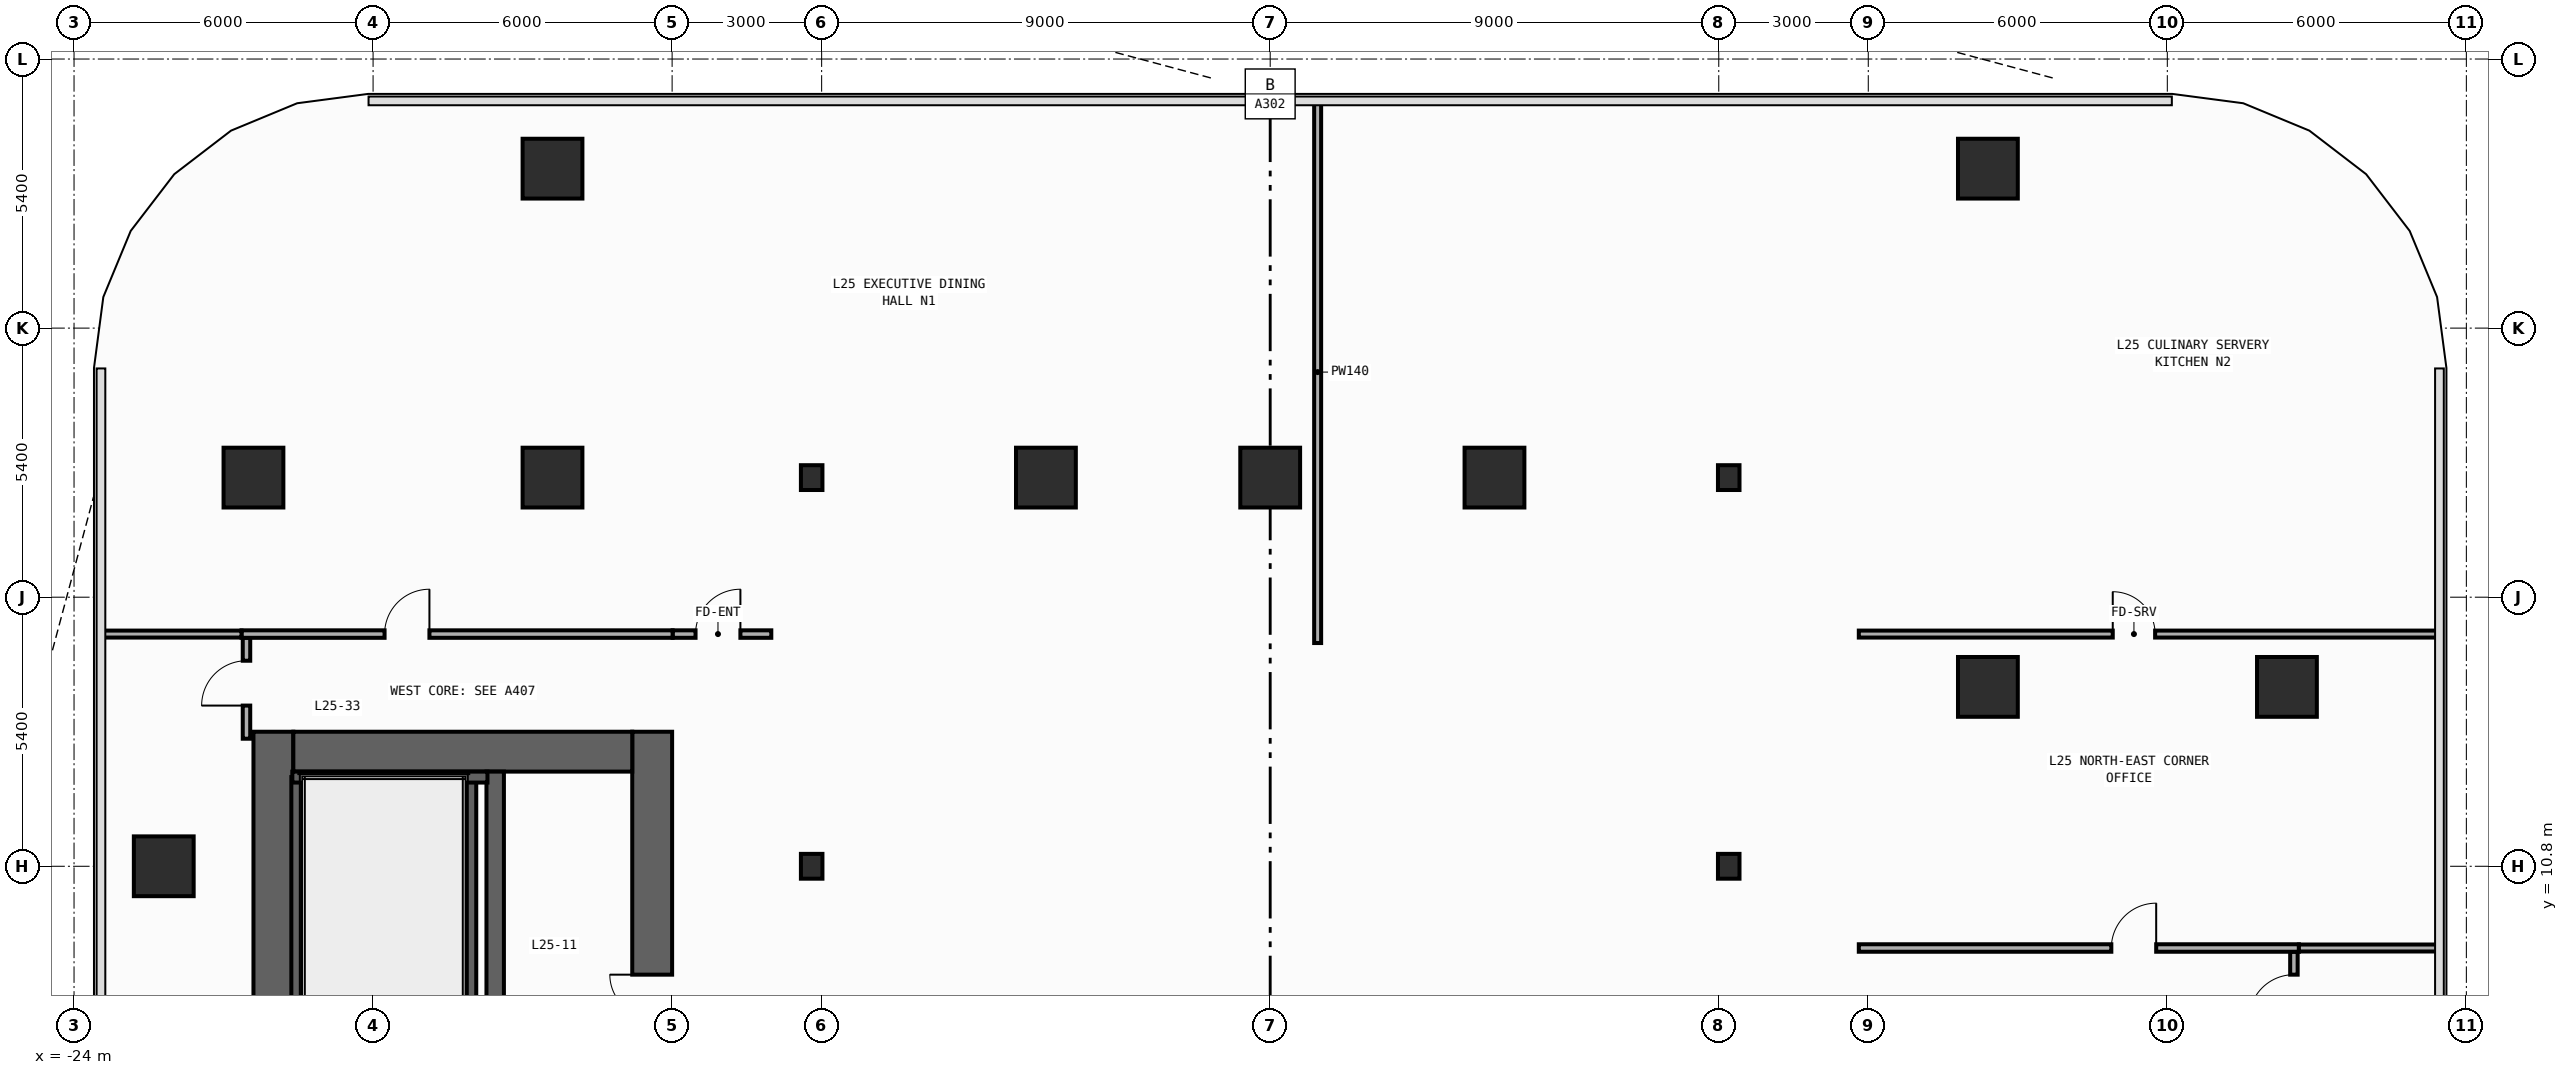
"""IFC4 building model, lengths in metres.
Left out: names, types, materials, properties, quantities, classifications, styles, units other than length and angle.
Written with IfcOpenShell. Run it as: python <this file> out.ifc"""

import sys

from ifc_helpers import new_model, si_unit, direction, frame, frame_2d, origin, origin_2d, place, context, subcontext, project, spatial, rectangle, i_section, extrude, element, fill, save


model = new_model("IFC4")
c1 = context("Model", 3, precision=1e-05, world=origin(), true_north=direction((0.0, 1.0)))
c2 = subcontext(c1, "Body", "Model", "MODEL_VIEW")
j1 = project(units=[si_unit("LENGTHUNIT", "METRE"), si_unit("PLANEANGLEUNIT", "RADIAN")], contexts=[c1])
p1 = place(None, origin())
s1 = spatial("IfcSite", under=j1, at=p1, CompositionType="ELEMENT")
p2 = place(p1, origin())
s2 = spatial("IfcBuilding", under=s1, at=p2, CompositionType="ELEMENT")
p3 = place(p2, frame((0.0, 0.0, 110.0)))
s3 = spatial("IfcBuildingStorey", under=s2, at=p3, CompositionType="ELEMENT", Elevation=110.0)
p4 = place(p3, frame((-20.0, -13.5, 0.0), z_axis=(0.0, 0.0, 1.0), x_axis=(0.0, 1.0, 0.0)))
e1 = element("IfcWall", 1, at=p4, inside=s3, PredefinedType="SHEAR", context=c2, shape_type="SweptSolid", body=[
    extrude(rectangle(XDim=27.0, YDim=0.8, at=frame_2d((13.5, 0.0))), origin(), (0.0, 0.0, 1.0), 3.94),
])
p5 = place(p3, frame((-12.4, -13.5, 0.0), z_axis=(0.0, 0.0, 1.0), x_axis=(0.0, 1.0, 0.0)))
e2 = element("IfcWall", 2, at=p5, inside=s3, PredefinedType="SHEAR", context=c2, shape_type="SweptSolid", body=[
    extrude(rectangle(XDim=27.0, YDim=0.8, at=frame_2d((13.5, 0.0))), origin(), (0.0, 0.0, 1.0), 3.94),
])
p6 = place(p5, frame((10.35, 0.0, 0.0)))
e3 = element("IfcOpeningElement", 3, at=p6, cuts=e2, PredefinedType="OPENING", context=c2, shape_type="SweptSolid", body=[
    extrude(rectangle(XDim=1.1, YDim=2.2, at=frame_2d((0.55, 1.1))), frame((0.0, 0.41, 0.0), z_axis=(0.0, -1.0, 0.0), x_axis=(1.0, 0.0, 0.0)), (0.0, 0.0, 1.0), 0.82),
])
p7 = place(p5, frame((7.15, 0.0, 0.0)))
e4 = element("IfcOpeningElement", 4, at=p7, cuts=e2, PredefinedType="OPENING", context=c2, shape_type="SweptSolid", body=[
    extrude(rectangle(XDim=1.1, YDim=2.2, at=frame_2d((0.55, 1.1))), frame((0.0, 0.41, 0.0), z_axis=(0.0, -1.0, 0.0), x_axis=(1.0, 0.0, 0.0)), (0.0, 0.0, 1.0), 0.82),
])
p8 = place(p5, frame((3.95, 0.0, 0.0)))
e5 = element("IfcOpeningElement", 5, at=p8, cuts=e2, PredefinedType="OPENING", context=c2, shape_type="SweptSolid", body=[
    extrude(rectangle(XDim=1.1, YDim=2.2, at=frame_2d((0.55, 1.1))), frame((0.0, 0.41, 0.0), z_axis=(0.0, -1.0, 0.0), x_axis=(1.0, 0.0, 0.0)), (0.0, 0.0, 1.0), 0.82),
])
p9 = place(p5, frame((15.175, 0.0, 0.0)))
e6 = element("IfcOpeningElement", 6, at=p9, cuts=e2, PredefinedType="OPENING", context=c2, shape_type="SweptSolid", body=[
    extrude(rectangle(XDim=0.85, YDim=2.1, at=frame_2d((0.425, 1.05))), frame((0.0, 0.41, 0.0), z_axis=(0.0, -1.0, 0.0), x_axis=(1.0, 0.0, 0.0)), (0.0, 0.0, 1.0), 0.82),
])
p10 = place(p5, frame((21.275, 0.0, 0.0)))
e7 = element("IfcOpeningElement", 7, at=p10, cuts=e2, PredefinedType="OPENING", context=c2, shape_type="SweptSolid", body=[
    extrude(rectangle(XDim=0.85, YDim=2.1, at=frame_2d((0.425, 1.05))), frame((0.0, 0.41, 0.0), z_axis=(0.0, -1.0, 0.0), x_axis=(1.0, 0.0, 0.0)), (0.0, 0.0, 1.0), 0.82),
])
p11 = place(p5, frame((12.725, 0.0, 0.0)))
e8 = element("IfcOpeningElement", 8, at=p11, cuts=e2, PredefinedType="OPENING", context=c2, shape_type="SweptSolid", body=[
    extrude(rectangle(XDim=1.15, YDim=2.2, at=frame_2d((0.575, 1.1))), frame((0.0, 0.41, 0.0), z_axis=(0.0, -1.0, 0.0), x_axis=(1.0, 0.0, 0.0)), (0.0, 0.0, 1.0), 0.82),
])
p12 = place(p5, frame((1.625, 0.0, 0.0)))
e9 = element("IfcOpeningElement", 9, at=p12, cuts=e2, PredefinedType="OPENING", context=c2, shape_type="SweptSolid", body=[
    extrude(rectangle(XDim=0.85, YDim=2.1, at=frame_2d((0.425, 1.05))), frame((0.0, 0.41, 0.0), z_axis=(0.0, -1.0, 0.0), x_axis=(1.0, 0.0, 0.0)), (0.0, 0.0, 1.0), 0.82),
])
p13 = place(p3, frame((-19.6, 13.1, 0.0), z_axis=(0.0, 0.0, 1.0), x_axis=(1.0, 0.0, 0.0)))
e10 = element("IfcWall", 10, at=p13, inside=s3, PredefinedType="SHEAR", context=c2, shape_type="SweptSolid", body=[
    extrude(rectangle(XDim=6.8, YDim=0.8, at=frame_2d((3.4, 0.0))), origin(), (0.0, 0.0, 1.0), 3.94),
])
p14 = place(p3, frame((-15.55, -12.7, 0.0), z_axis=(0.0, 0.0, 1.0), x_axis=(0.0, 1.0, 0.0)))
e11 = element("IfcWall", 11, at=p14, inside=s3, PredefinedType="SHEAR", context=c2, shape_type="SweptSolid", body=[
    extrude(rectangle(XDim=25.4, YDim=0.35, at=frame_2d((12.7, 0.0))), origin(), (0.0, 0.0, 1.0), 3.94),
])
p15 = place(p14, frame((11.925, 0.0, 0.0)))
e12 = element("IfcOpeningElement", 12, at=p15, cuts=e11, PredefinedType="OPENING", context=c2, shape_type="SweptSolid", body=[
    extrude(rectangle(XDim=1.15, YDim=2.2, at=frame_2d((0.575, 1.1))), frame((0.0, 0.185, 0.0), z_axis=(0.0, -1.0, 0.0), x_axis=(1.0, 0.0, 0.0)), (0.0, 0.0, 1.0), 0.37),
])
p16 = place(p14, frame((0.825, 0.0, 0.0)))
e13 = element("IfcOpeningElement", 13, at=p16, cuts=e11, PredefinedType="OPENING", context=c2, shape_type="SweptSolid", body=[
    extrude(rectangle(XDim=0.85, YDim=2.1, at=frame_2d((0.425, 1.05))), frame((0.0, 0.185, 0.0), z_axis=(0.0, -1.0, 0.0), x_axis=(1.0, 0.0, 0.0)), (0.0, 0.0, 1.0), 0.37),
])
for number, where, z_axis, x_axis in (
    (14, (-16.04, 1.29, 0.0), (0.0, 0.0, 1.0), (0.0, 1.0, 0.0)),
    (15, (-19.53, 1.29, 0.0), (0.0, 0.0, 1.0), (0.0, 1.0, 0.0)),
):
    element("IfcWall", number, at=place(p3, frame(where, z_axis=z_axis, x_axis=x_axis)), inside=s3, PredefinedType="SHEAR", context=c2, shape_type="SweptSolid", body=[
        extrude(rectangle(XDim=11.3, YDim=0.22, at=frame_2d((5.65, 0.0))), origin(), (0.0, 0.0, 1.0), 3.94),
    ])
p17 = place(p3, frame((-19.62, 12.59, 0.0), z_axis=(0.0, 0.0, 1.0), x_axis=(1.0, 0.0, 0.0)))
e16 = element("IfcWall", 16, at=p17, inside=s3, PredefinedType="SHEAR", context=c2, shape_type="SweptSolid", body=[
    extrude(rectangle(XDim=3.915, YDim=0.22, at=frame_2d((1.958, 0.0))), origin(), (0.0, 0.0, 1.0), 3.94),
])
for number, where, z_axis, x_axis in (
    (17, (-9.2, 10.8, 0.0), (0.0, 0.0, 1.0), (1.0, 0.0, 0.0)),
    (18, (-9.2, 18.6, 0.0), (0.0, 0.0, 1.0), (1.0, 0.0, 0.0)),
    (19, (9.2, 10.8, 0.0), (0.0, 0.0, 1.0), (1.0, 0.0, 0.0)),
    (20, (9.2, 18.6, 0.0), (0.0, 0.0, 1.0), (1.0, 0.0, 0.0)),
):
    element("IfcColumn", number, at=place(p3, frame(where, z_axis=z_axis, x_axis=x_axis)), inside=s3, PredefinedType="COLUMN", context=c2, shape_type="SweptSolid", body=[
        extrude(i_section(OverallWidth=0.432, OverallDepth=0.498, WebThickness=0.045, FlangeThickness=0.07, FilletRadius=0.022, at=origin_2d()), origin(), (0.0, 0.0, 1.0), 4.2),
    ])
for number, where, z_axis, x_axis in (
    (21, (-20.4, 18.6, 0.0), (0.0, 0.0, 1.0), (1.0, 0.0, 0.0)),
    (22, (20.4, 14.4, 0.0), (0.0, 0.0, 1.0), (1.0, 0.0, 0.0)),
    (23, (-14.4, 18.6, 0.0), (0.0, 0.0, 1.0), (1.0, 0.0, 0.0)),
    (24, (14.4, 14.4, 0.0), (0.0, 0.0, 1.0), (1.0, 0.0, 0.0)),
    (25, (-4.5, 18.6, 0.0), (0.0, 0.0, 1.0), (1.0, 0.0, 0.0)),
    (26, (0.0, 18.6, 0.0), (0.0, 0.0, 1.0), (1.0, 0.0, 0.0)),
    (27, (4.5, 18.6, 0.0), (0.0, 0.0, 1.0), (1.0, 0.0, 0.0)),
    (28, (-22.2, 10.8, 0.0), (0.0, 0.0, 1.0), (1.0, 0.0, 0.0)),
    (29, (-14.4, 24.8, 0.0), (0.0, 0.0, 1.0), (1.0, 0.0, 0.0)),
    (30, (14.4, 24.8, 0.0), (0.0, 0.0, 1.0), (1.0, 0.0, 0.0)),
):
    element("IfcColumn", number, at=place(p3, frame(where, z_axis=z_axis, x_axis=x_axis)), inside=s3, PredefinedType="COLUMN", context=c2, shape_type="SweptSolid", body=[
        extrude(rectangle(XDim=1.2, YDim=1.2, at=origin_2d()), origin(), (0.0, 0.0, 1.0), 4.2),
    ])
p18 = place(p3, frame((-11.99, 15.46, 0.0), z_axis=(0.0, 0.0, 1.0), x_axis=(1.0, 0.0, 0.0)))
e31 = element("IfcWall", 31, at=p18, inside=s3, PredefinedType="PARTITIONING", context=c2, shape_type="SweptSolid", body=[
    extrude(rectangle(XDim=1.98, YDim=0.15, at=frame_2d((0.99, 0.0))), origin(), (0.0, 0.0, 1.0), 3.94),
])
p19 = place(p18, frame((0.46, 0.0, 0.0)))
e32 = element("IfcOpeningElement", 32, at=p19, cuts=e31, PredefinedType="OPENING", context=c2, shape_type="SweptSolid", body=[
    extrude(rectangle(XDim=0.9, YDim=2.15, at=frame_2d((0.45, 1.075))), frame((0.0, 0.085, 0.0), z_axis=(0.0, -1.0, 0.0), x_axis=(1.0, 0.0, 0.0)), (0.0, 0.0, 1.0), 0.17),
])
p20 = place(p3, frame((-20.54, 13.36, 0.0), z_axis=(0.0, 0.0, 1.0), x_axis=(0.0, 1.0, 0.0)))
e33 = element("IfcWall", 33, at=p20, inside=s3, PredefinedType="PARTITIONING", context=c2, shape_type="SweptSolid", body=[
    extrude(rectangle(XDim=2.025, YDim=0.15, at=frame_2d((1.012, 0.0))), origin(), (0.0, 0.0, 1.0), 3.94),
])
p21 = place(p20, frame((0.665, 0.0, 0.0)))
e34 = element("IfcOpeningElement", 34, at=p21, cuts=e33, PredefinedType="OPENING", context=c2, shape_type="SweptSolid", body=[
    extrude(rectangle(XDim=0.9, YDim=2.15, at=frame_2d((0.45, 1.075))), frame((0.0, 0.085, 0.0), z_axis=(0.0, -1.0, 0.0), x_axis=(1.0, 0.0, 0.0)), (0.0, 0.0, 1.0), 0.17),
])
p22 = place(p3, frame((-20.64, 15.46, 0.0), z_axis=(0.0, 0.0, 1.0), x_axis=(1.0, 0.0, 0.0)))
e35 = element("IfcWall", 35, at=p22, inside=s3, PredefinedType="PARTITIONING", context=c2, shape_type="SweptSolid", body=[
    extrude(rectangle(XDim=8.65, YDim=0.15, at=frame_2d((4.325, 0.0))), origin(), (0.0, 0.0, 1.0), 3.94),
])
p23 = place(p22, frame((2.871, 0.0, 0.0)))
e36 = element("IfcOpeningElement", 36, at=p23, cuts=e35, PredefinedType="OPENING", context=c2, shape_type="SweptSolid", body=[
    extrude(rectangle(XDim=0.9, YDim=2.15, at=frame_2d((0.45, 1.075))), frame((0.0, 0.085, 0.0), z_axis=(0.0, -1.0, 0.0), x_axis=(1.0, 0.0, 0.0)), (0.0, 0.0, 1.0), 0.17),
])
p24 = place(p3, frame((20.54, 7.06, 0.0), z_axis=(0.0, 0.0, 1.0), x_axis=(0.0, 1.0, 0.0)))
e37 = element("IfcWall", 37, at=p24, inside=s3, PredefinedType="PARTITIONING", context=c2, shape_type="SweptSolid", body=[
    extrude(rectangle(XDim=2.025, YDim=0.15, at=frame_2d((1.012, 0.0))), origin(), (0.0, 0.0, 1.0), 3.94),
])
p25 = place(p24, frame((0.665, 0.0, 0.0)))
e38 = element("IfcOpeningElement", 38, at=p25, cuts=e37, PredefinedType="OPENING", context=c2, shape_type="SweptSolid", body=[
    extrude(rectangle(XDim=0.9, YDim=2.15, at=frame_2d((0.45, 1.075))), frame((0.0, 0.085, 0.0), z_axis=(0.0, -1.0, 0.0), x_axis=(1.0, 0.0, 0.0)), (0.0, 0.0, 1.0), 0.17),
])
p26 = place(p3, frame((11.81, 9.16, 0.0), z_axis=(0.0, 0.0, 1.0), x_axis=(1.0, 0.0, 0.0)))
e39 = element("IfcWall", 39, at=p26, inside=s3, PredefinedType="PARTITIONING", context=c2, shape_type="SweptSolid", body=[
    extrude(rectangle(XDim=8.83, YDim=0.15, at=frame_2d((4.415, 0.0))), origin(), (0.0, 0.0, 1.0), 3.94),
])
p27 = place(p26, frame((5.067, 0.0, 0.0)))
e40 = element("IfcOpeningElement", 40, at=p27, cuts=e39, PredefinedType="OPENING", context=c2, shape_type="SweptSolid", body=[
    extrude(rectangle(XDim=0.9, YDim=2.15, at=frame_2d((0.45, 1.075))), frame((0.0, 0.085, 0.0), z_axis=(0.0, -1.0, 0.0), x_axis=(1.0, 0.0, 0.0)), (0.0, 0.0, 1.0), 0.17),
])
for number, where, z_axis, x_axis in (
    (41, (-23.455, 15.46, 0.0), (0.0, 0.0, 1.0), (1.0, 0.0, 0.0)),
    (42, (20.64, 9.16, 0.0), (0.0, 0.0, 1.0), (1.0, 0.0, 0.0)),
):
    element("IfcWall", number, at=place(p3, frame(where, z_axis=z_axis, x_axis=x_axis)), inside=s3, PredefinedType="PARTITIONING", context=c2, shape_type="SweptSolid", body=[
        extrude(rectangle(XDim=2.815, YDim=0.14, at=frame_2d((1.408, 0.0))), origin(), (0.0, 0.0, 1.0), 3.94),
    ])
p28 = place(p3, frame((11.81, 15.46, 0.0), z_axis=(0.0, 0.0, 1.0), x_axis=(1.0, 0.0, 0.0)))
e43 = element("IfcWall", 43, at=p28, inside=s3, PredefinedType="PARTITIONING", context=c2, shape_type="SweptSolid", body=[
    extrude(rectangle(XDim=11.645, YDim=0.14, at=frame_2d((5.823, 0.0))), origin(), (0.0, 0.0, 1.0), 3.94),
])
p29 = place(p28, frame((5.095, 0.0, 0.0)))
e44 = element("IfcOpeningElement", 44, at=p29, cuts=e43, PredefinedType="OPENING", context=c2, shape_type="SweptSolid", body=[
    extrude(rectangle(XDim=0.85, YDim=2.1, at=frame_2d((0.425, 1.05))), frame((0.0, 0.08, 0.0), z_axis=(0.0, -1.0, 0.0), x_axis=(1.0, 0.0, 0.0)), (0.0, 0.0, 1.0), 0.16),
])
p30 = place(p3, frame((0.952, 15.28, 0.0), z_axis=(0.0, 0.0, 1.0), x_axis=(0.0, 1.0, 0.0)))
e45 = element("IfcWall", 45, at=p30, inside=s3, PredefinedType="PARTITIONING", context=c2, shape_type="SweptSolid", body=[
    extrude(rectangle(XDim=10.875, YDim=0.14, at=frame_2d((5.438, 0.0))), origin(), (0.0, 0.0, 1.0), 3.94),
])
p31 = place(p10, origin())
e46 = element("IfcDoor", 46, at=p31, inside=s3, OperationType="SINGLE_SWING_RIGHT", PredefinedType="DOOR", context=c2, shape_type="SweptSolid", body=[
    extrude(rectangle(XDim=0.85, YDim=2.1, at=frame_2d((0.425, 1.05))), frame((0.0, 0.025, 0.0), z_axis=(0.0, -1.0, 0.0), x_axis=(1.0, 0.0, 0.0)), (0.0, 0.0, 1.0), 0.05),
])
fill(e7, e46)
p32 = place(p19, origin())
e47 = element("IfcDoor", 47, at=p32, inside=s3, OperationType="SINGLE_SWING_RIGHT", PredefinedType="DOOR", context=c2, shape_type="SweptSolid", body=[
    extrude(rectangle(XDim=0.9, YDim=2.15, at=frame_2d((0.45, 1.075))), frame((0.0, 0.025, 0.0), z_axis=(0.0, -1.0, 0.0), x_axis=(1.0, 0.0, 0.0)), (0.0, 0.0, 1.0), 0.05),
])
fill(e32, e47)
p33 = place(p21, origin())
e48 = element("IfcDoor", 48, at=p33, inside=s3, OperationType="SINGLE_SWING_LEFT", PredefinedType="DOOR", context=c2, shape_type="SweptSolid", body=[
    extrude(rectangle(XDim=0.9, YDim=2.15, at=frame_2d((0.45, 1.075))), frame((0.0, 0.025, 0.0), z_axis=(0.0, -1.0, 0.0), x_axis=(1.0, 0.0, 0.0)), (0.0, 0.0, 1.0), 0.05),
])
fill(e34, e48)
p34 = place(p23, origin())
e49 = element("IfcDoor", 49, at=p34, inside=s3, OperationType="SINGLE_SWING_RIGHT", PredefinedType="DOOR", context=c2, shape_type="SweptSolid", body=[
    extrude(rectangle(XDim=0.9, YDim=2.15, at=frame_2d((0.45, 1.075))), frame((0.0, 0.025, 0.0), z_axis=(0.0, -1.0, 0.0), x_axis=(1.0, 0.0, 0.0)), (0.0, 0.0, 1.0), 0.05),
])
fill(e36, e49)
p35 = place(p25, origin())
e50 = element("IfcDoor", 50, at=p35, inside=s3, OperationType="SINGLE_SWING_LEFT", PredefinedType="DOOR", context=c2, shape_type="SweptSolid", body=[
    extrude(rectangle(XDim=0.9, YDim=2.15, at=frame_2d((0.45, 1.075))), frame((0.0, 0.025, 0.0), z_axis=(0.0, -1.0, 0.0), x_axis=(1.0, 0.0, 0.0)), (0.0, 0.0, 1.0), 0.05),
])
fill(e38, e50)
p36 = place(p27, origin())
e51 = element("IfcDoor", 51, at=p36, inside=s3, OperationType="SINGLE_SWING_RIGHT", PredefinedType="DOOR", context=c2, shape_type="SweptSolid", body=[
    extrude(rectangle(XDim=0.9, YDim=2.15, at=frame_2d((0.45, 1.075))), frame((0.0, 0.025, 0.0), z_axis=(0.0, -1.0, 0.0), x_axis=(1.0, 0.0, 0.0)), (0.0, 0.0, 1.0), 0.05),
])
fill(e40, e51)
p37 = place(p29, origin())
e52 = element("IfcDoor", 52, at=p37, inside=s3, OperationType="SINGLE_SWING_LEFT", PredefinedType="DOOR", context=c2, shape_type="SweptSolid", body=[
    extrude(rectangle(XDim=0.85, YDim=2.1, at=frame_2d((0.425, 1.05))), frame((0.0, 0.025, 0.0), z_axis=(0.0, -1.0, 0.0), x_axis=(1.0, 0.0, 0.0)), (0.0, 0.0, 1.0), 0.05),
])
fill(e44, e52)
save(model, sys.argv[1])
